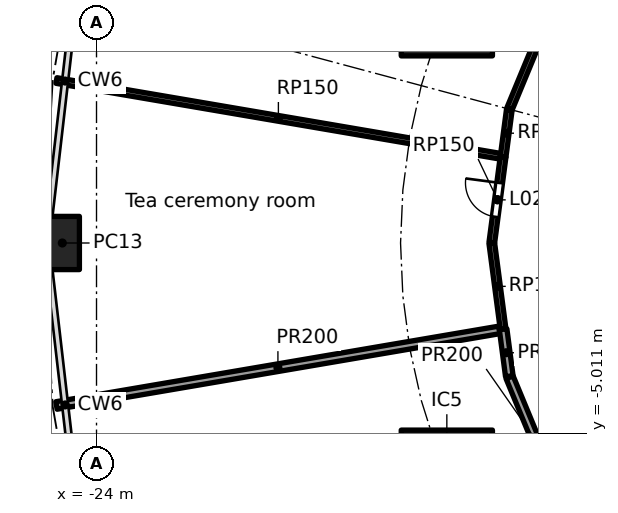
"""IFC4 building model, lengths in metres.
Left out: names, types, materials, properties, quantities, classifications, styles, units other than length and angle.
Written with IfcOpenShell. Run it as: python <this file> out.ifc"""

import sys

from ifc_helpers import new_model, si_unit, direction, frame, frame_2d, origin, origin_2d, place, context, subcontext, project, spatial, rectangle, hollow_rectangle, extrude, element, fill, save


model = new_model("IFC4")
c1 = context("Model", 3, precision=1e-05, world=origin(), true_north=direction((0.0, 1.0)))
c2 = subcontext(c1, "Body", "Model", "MODEL_VIEW")
j1 = project(units=[si_unit("LENGTHUNIT", "METRE"), si_unit("PLANEANGLEUNIT", "RADIAN")], contexts=[c1])
p1 = place(None, origin())
s1 = spatial("IfcSite", under=j1, at=p1, CompositionType="ELEMENT")
p2 = place(p1, origin())
s2 = spatial("IfcBuilding", under=s1, at=p2, CompositionType="ELEMENT")
p3 = place(p2, frame((0.0, 0.0, 12.0)))
s3 = spatial("IfcBuildingStorey", under=s2, at=p3, CompositionType="ELEMENT", Elevation=12.0)
p4 = place(p3, frame((-24.9, 0.0, 0.0), z_axis=(0.0, 0.0, 1.0), x_axis=(0.0, -1.0, 0.0)))
e1 = element("IfcColumn", 1, at=p4, inside=s3, PredefinedType="COLUMN", context=c2, shape_type="SweptSolid", body=[
    extrude(hollow_rectangle(XDim=1.4, YDim=0.9, WallThickness=0.05, at=origin_2d()), origin(), (0.0, 0.0, 1.0), 5.0),
])
for number, where, z_axis, x_axis in (
    (2, (-14.782, 6.123, 0.0), (0.0, 0.0, 1.0), (1.0, 0.0, 0.0)),
    (3, (-14.782, -6.123, 0.0), (0.0, 0.0, 1.0), (1.0, 0.0, 0.0)),
):
    element("IfcColumn", number, at=place(p3, frame(where, z_axis=z_axis, x_axis=x_axis)), inside=s3, PredefinedType="COLUMN", context=c2, shape_type="SweptSolid", body=[
        extrude(rectangle(XDim=2.4, YDim=2.4, at=origin_2d()), origin(), (0.0, 0.0, 1.0), 5.0),
    ])
p5 = place(p3, frame((-13.598, 0.012, 0.0), z_axis=(0.0, 0.0, 1.0), x_axis=(0.130457285505, 0.991453930679, 0.0)))
e4 = element("IfcWall", 4, at=p5, inside=s3, PredefinedType="PARTITIONING", context=c2, shape_type="SweptSolid", body=[
    extrude(rectangle(XDim=2.278, YDim=0.15, at=frame_2d((1.139, 0.0))), origin(), (0.0, 0.0, 1.0), 4.7),
])
p6 = place(p5, frame((0.683, 0.0, 0.0)))
e5 = element("IfcOpeningElement", 5, at=p6, cuts=e4, PredefinedType="OPENING", context=c2, shape_type="SweptSolid", body=[
    extrude(rectangle(XDim=0.9, YDim=2.1, at=frame_2d((0.45, 1.05))), frame((0.0, 0.085, 0.0), z_axis=(0.0, -1.0, 0.0), x_axis=(1.0, 0.0, 0.0)), (0.0, 0.0, 1.0), 0.17),
])
p7 = place(p3, frame((-13.301, -2.27, 0.0), z_axis=(0.0, 0.0, 1.0), x_axis=(-0.130457285505, 0.991453930679, 0.0)))
e6 = element("IfcWall", 6, at=p7, inside=s3, PredefinedType="PARTITIONING", context=c2, shape_type="SweptSolid", body=[
    extrude(rectangle(XDim=2.278, YDim=0.15, at=frame_2d((1.139, 0.0))), origin(), (0.0, 0.0, 1.0), 4.7),
])
p8 = place(p3, frame((-13.375, 2.282, 0.0), z_axis=(0.0, 0.0, 1.0), x_axis=(-0.985753347153, 0.168197320361, 0.0)))
e7 = element("IfcWall", 7, at=p8, inside=s3, PredefinedType="PARTITIONING", context=c2, shape_type="SweptSolid", body=[
    extrude(rectangle(XDim=11.847, YDim=0.15, at=frame_2d((5.924, 0.0))), origin(), (0.0, 0.0, 1.0), 4.7),
])
p9 = place(p3, frame((-13.301, 2.27, 0.0), z_axis=(0.0, 0.0, 1.0), x_axis=(0.130575867104, 0.991438320285, 0.0)))
e8 = element("IfcWall", 8, at=p9, inside=s3, PredefinedType="PARTITIONING", context=c2, shape_type="SweptSolid", body=[
    extrude(rectangle(XDim=1.249, YDim=0.15, at=frame_2d((0.625, 0.0))), origin(), (0.0, 0.0, 1.0), 4.7),
])
p10 = place(p3, frame((-13.132, 3.531, 0.0), z_axis=(0.0, 0.0, 1.0), x_axis=(0.382677866108, 0.923881838111, 0.0)))
e9 = element("IfcWall", 9, at=p10, inside=s3, PredefinedType="PARTITIONING", context=c2, shape_type="SweptSolid", body=[
    extrude(rectangle(XDim=3.527, YDim=0.15, at=frame_2d((1.763, 0.0))), origin(), (0.0, 0.0, 1.0), 4.7),
])
p11 = place(p3, frame((-13.4, -2.287, 0.0), z_axis=(0.0, 0.0, 1.0), x_axis=(-0.985752547827, -0.168202004903, 0.0)))
e10 = element("IfcWall", 10, at=p11, inside=s3, PredefinedType="PARTITIONING", context=c2, shape_type="SweptSolid", body=[
    extrude(rectangle(XDim=11.822, YDim=0.2, at=frame_2d((5.911, 0.0))), origin(), (0.0, 0.0, 1.0), 4.7),
])
p12 = place(p3, frame((-13.139, -3.505, 0.0), z_axis=(0.0, 0.0, 1.0), x_axis=(-0.130520415919, 0.991445621821, 0.0)))
e11 = element("IfcWall", 11, at=p12, inside=s3, PredefinedType="PARTITIONING", context=c2, shape_type="SweptSolid", body=[
    extrude(rectangle(XDim=1.246, YDim=0.2, at=frame_2d((0.623, 0.0))), origin(), (0.0, 0.0, 1.0), 4.7),
])
p13 = place(p3, frame((-11.784, -6.786, 0.0), z_axis=(0.0, 0.0, 1.0), x_axis=(-0.382723413813, 0.92386297064, 0.0)))
e12 = element("IfcWall", 12, at=p13, inside=s3, PredefinedType="PARTITIONING", context=c2, shape_type="SweptSolid", body=[
    extrude(rectangle(XDim=3.52, YDim=0.2, at=frame_2d((1.76, 0.0))), origin(), (0.0, 0.0, 1.0), 4.7),
])
p14 = place(p13, frame((0.342, 0.0, 0.0)))
e13 = element("IfcOpeningElement", 13, at=p14, cuts=e12, PredefinedType="OPENING", context=c2, shape_type="SweptSolid", body=[
    extrude(rectangle(XDim=0.9, YDim=2.1, at=frame_2d((0.45, 1.05))), frame((0.0, 0.11, 0.0), z_axis=(0.0, -1.0, 0.0), x_axis=(1.0, 0.0, 0.0)), (0.0, 0.0, 1.0), 0.22),
])
p15 = place(p6, origin())
e14 = element("IfcDoor", 14, at=p15, inside=s3, OperationType="SINGLE_SWING_RIGHT", PredefinedType="DOOR", context=c2, shape_type="SweptSolid", body=[
    extrude(rectangle(XDim=0.9, YDim=2.1, at=frame_2d((0.45, 1.05))), frame((0.0, 0.025, 0.0), z_axis=(0.0, -1.0, 0.0), x_axis=(1.0, 0.0, 0.0)), (0.0, 0.0, 1.0), 0.05),
])
fill(e5, e14)
save(model, sys.argv[1])
